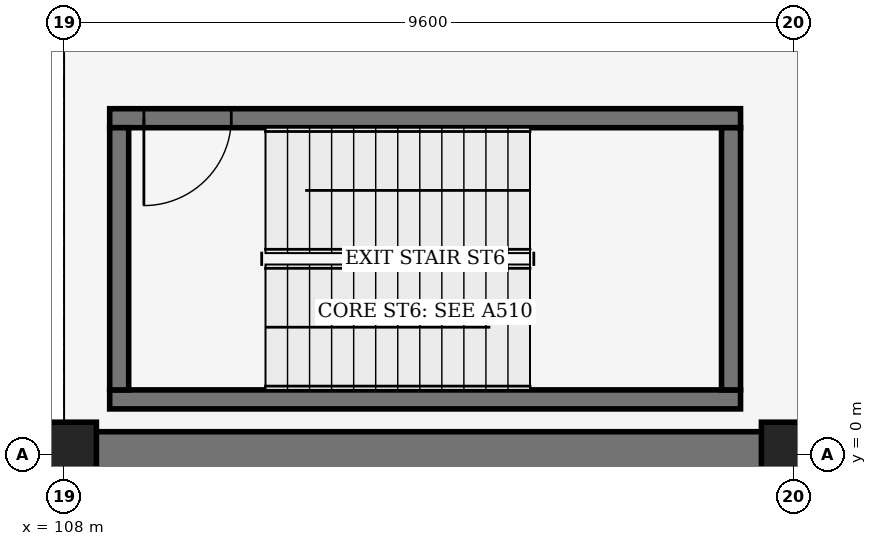
"""IFC4 building model, lengths in metres.
Left out: names, types, materials, properties, quantities, classifications, styles, units other than length and angle.
Written with IfcOpenShell. Run it as: python <this file> out.ifc"""

import sys

from ifc_helpers import new_model, si_unit, direction, frame, frame_2d, origin, origin_2d, place, context, subcontext, project, spatial, rectangle, extrude, element, fill, save


model = new_model("IFC4")
c1 = context("Model", 3, precision=1e-05, world=origin(), true_north=direction((0.0, 1.0)))
c2 = subcontext(c1, "Body", "Model", "MODEL_VIEW")
j1 = project(units=[si_unit("LENGTHUNIT", "METRE"), si_unit("PLANEANGLEUNIT", "RADIAN")], contexts=[c1])
p1 = place(None, origin())
s1 = spatial("IfcSite", under=j1, at=p1, CompositionType="ELEMENT")
p2 = place(p1, origin())
s2 = spatial("IfcBuilding", under=s1, at=p2, CompositionType="ELEMENT")
p3 = place(p2, frame((0.0, 0.0, -9.6)))
s3 = spatial("IfcBuildingStorey", under=s2, at=p3, CompositionType="ELEMENT", Elevation=-9.6)
for number, where, z_axis, x_axis in (
    (1, (108.0, 0.0, 0.0), (0.0, 0.0, 1.0), (1.0, 0.0, 0.0)),
    (2, (117.6, 0.0, 0.0), (0.0, 0.0, 1.0), (1.0, 0.0, 0.0)),
):
    element("IfcColumn", number, at=place(p3, frame(where, z_axis=z_axis, x_axis=x_axis)), inside=s3, PredefinedType="COLUMN", context=c2, shape_type="SweptSolid", body=[
        extrude(rectangle(XDim=0.85, YDim=0.85, at=origin_2d()), origin(), (0.0, 0.0, 1.0), 4.8),
    ])
p4 = place(p3, frame((122.64, 0.0, 0.0), z_axis=(0.0, 0.0, 1.0), x_axis=(-1.0, 0.0, 0.0)))
e3 = element("IfcWall", 3, at=p4, inside=s3, PredefinedType="USERDEFINED", context=c2, shape_type="SweptSolid", body=[
    extrude(rectangle(XDim=17.52, YDim=0.6, at=frame_2d((8.76, 0.0))), origin(), (0.0, 0.0, 1.0), 4.8),
])
p5 = place(p3, frame((108.6, 0.725, 0.0), z_axis=(0.0, 0.0, 1.0), x_axis=(1.0, 0.0, 0.0)))
e4 = element("IfcWall", 4, at=p5, inside=s3, PredefinedType="SHEAR", context=c2, shape_type="SweptSolid", body=[
    extrude(rectangle(XDim=8.3, YDim=0.25, at=frame_2d((4.15, 0.0))), origin(), (0.0, 0.0, 1.0), 4.45),
])
p6 = place(p3, frame((116.9, 4.425, 0.0), z_axis=(0.0, 0.0, 1.0), x_axis=(-1.0, 0.0, 0.0)))
e5 = element("IfcWall", 5, at=p6, inside=s3, PredefinedType="SHEAR", context=c2, shape_type="SweptSolid", body=[
    extrude(rectangle(XDim=8.3, YDim=0.25, at=frame_2d((4.15, 0.0))), origin(), (0.0, 0.0, 1.0), 4.45),
])
p7 = place(p6, frame((7.85, 0.0, 0.0), z_axis=(0.0, 0.0, 1.0), x_axis=(-1.0, 0.0, 0.0)))
e6 = element("IfcOpeningElement", 6, at=p7, cuts=e5, PredefinedType="OPENING", context=c2, shape_type="SweptSolid", body=[
    extrude(rectangle(XDim=1.15, YDim=2.2, at=frame_2d((0.575, 1.1))), frame((0.0, 0.135, 0.0), z_axis=(0.0, -1.0, 0.0), x_axis=(1.0, 0.0, 0.0)), (0.0, 0.0, 1.0), 0.27),
])
for number, where, z_axis, x_axis in (
    (7, (108.725, 4.3, 0.0), (0.0, 0.0, 1.0), (0.0, -1.0, 0.0)),
    (8, (116.775, 0.85, 0.0), (0.0, 0.0, 1.0), (0.0, 1.0, 0.0)),
):
    element("IfcWall", number, at=place(p3, frame(where, z_axis=z_axis, x_axis=x_axis)), inside=s3, PredefinedType="SHEAR", context=c2, shape_type="SweptSolid", body=[
        extrude(rectangle(XDim=3.45, YDim=0.25, at=frame_2d((1.725, 0.0))), origin(), (0.0, 0.0, 1.0), 4.45),
    ])
p8 = place(p7, origin())
e9 = element("IfcDoor", 9, at=p8, inside=s3, OperationType="SINGLE_SWING_LEFT", PredefinedType="DOOR", context=c2, shape_type="SweptSolid", body=[
    extrude(rectangle(XDim=1.15, YDim=2.2, at=frame_2d((0.575, 1.1))), frame((0.0, 0.025, 0.0), z_axis=(0.0, -1.0, 0.0), x_axis=(1.0, 0.0, 0.0)), (0.0, 0.0, 1.0), 0.05),
])
fill(e6, e9)
save(model, sys.argv[1])
